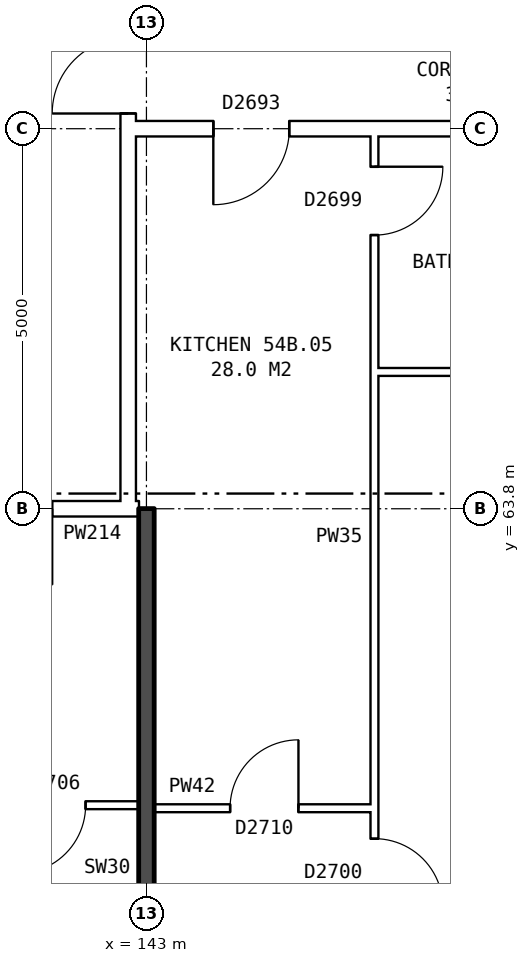
"""IFC4 building model, lengths in metres.
Left out: names, types, materials, properties, quantities, classifications, styles, units other than length and angle.
Written with IfcOpenShell. Run it as: python <this file> out.ifc"""

import sys

from ifc_helpers import new_model, si_unit, direction, frame, frame_2d, origin, place, context, subcontext, project, spatial, rectangle, extrude, element, fill, save


model = new_model("IFC4")
c1 = context("Model", 3, precision=1e-05, world=origin(), true_north=direction((0.0, 1.0)))
c2 = subcontext(c1, "Body", "Model", "MODEL_VIEW")
j1 = project(units=[si_unit("LENGTHUNIT", "METRE"), si_unit("PLANEANGLEUNIT", "RADIAN")], contexts=[c1])
p1 = place(None, origin())
s1 = spatial("IfcSite", under=j1, at=p1, CompositionType="ELEMENT")
p2 = place(p1, origin())
s2 = spatial("IfcBuilding", under=s1, at=p2, CompositionType="ELEMENT")
p3 = place(p2, frame((0.0, 0.0, 191.3)))
s3 = spatial("IfcBuildingStorey", under=s2, at=p3, CompositionType="ELEMENT", Elevation=191.3)
p4 = place(p3, frame((142.76, 63.9, 0.0), z_axis=(0.0, 0.0, 1.0), x_axis=(0.0, 1.0, 0.0)))
e1 = element("IfcWall", 1, at=p4, inside=s3, PredefinedType="PARTITIONING", context=c2, shape_type="SweptSolid", body=[
    extrude(rectangle(XDim=12.2, YDim=0.2, at=frame_2d((6.1, 0.0))), origin(), (0.0, 0.0, 1.0), 2.85),
])
p5 = place(p4, frame((5.1, 0.0, 0.0)))
e2 = element("IfcOpeningElement", 2, at=p5, cuts=e1, PredefinedType="OPENING", context=c2, shape_type="SweptSolid", body=[
    extrude(rectangle(XDim=2.0, YDim=2.1, at=frame_2d((1.0, 1.05))), frame((0.0, 0.11, 0.0), z_axis=(0.0, -1.0, 0.0), x_axis=(1.0, 0.0, 0.0)), (0.0, 0.0, 1.0), 0.22),
])
p6 = place(p3, frame((143.1, 59.86, 0.0), z_axis=(0.0, 0.0, 1.0), x_axis=(1.0, 0.0, 0.0)))
e3 = element("IfcWall", 3, at=p6, inside=s3, PredefinedType="PARTITIONING", context=c2, shape_type="SweptSolid", body=[
    extrude(rectangle(XDim=2.9, YDim=0.1, at=frame_2d((1.45, 0.0))), origin(), (0.0, 0.0, 1.0), 2.85),
])
p7 = place(p6, frame((1.0, 0.0, 0.0)))
e4 = element("IfcOpeningElement", 4, at=p7, cuts=e3, PredefinedType="OPENING", context=c2, shape_type="SweptSolid", body=[
    extrude(rectangle(XDim=0.9, YDim=2.1, at=frame_2d((0.45, 1.05))), frame((0.0, 0.06, 0.0), z_axis=(0.0, -1.0, 0.0), x_axis=(1.0, 0.0, 0.0)), (0.0, 0.0, 1.0), 0.12),
])
p8 = place(p3, frame((137.1, 59.9, 0.0), z_axis=(0.0, 0.0, 1.0), x_axis=(1.0, 0.0, 0.0)))
e5 = element("IfcWall", 5, at=p8, inside=s3, PredefinedType="PARTITIONING", context=c2, shape_type="SweptSolid", body=[
    extrude(rectangle(XDim=5.8, YDim=0.1, at=frame_2d((2.9, 0.0))), origin(), (0.0, 0.0, 1.0), 2.85),
])
p9 = place(p8, frame((1.3, 0.0, 0.0)))
e6 = element("IfcOpeningElement", 6, at=p9, cuts=e5, PredefinedType="OPENING", context=c2, shape_type="SweptSolid", body=[
    extrude(rectangle(XDim=0.9, YDim=2.1, at=frame_2d((0.45, 1.05))), frame((0.0, 0.06, 0.0), z_axis=(0.0, -1.0, 0.0), x_axis=(1.0, 0.0, 0.0)), (0.0, 0.0, 1.0), 0.12),
])
p10 = place(p8, frame((4.2, 0.0, 0.0)))
e7 = element("IfcOpeningElement", 7, at=p10, cuts=e5, PredefinedType="OPENING", context=c2, shape_type="SweptSolid", body=[
    extrude(rectangle(XDim=0.9, YDim=2.1, at=frame_2d((0.45, 1.05))), frame((0.0, 0.06, 0.0), z_axis=(0.0, -1.0, 0.0), x_axis=(1.0, 0.0, 0.0)), (0.0, 0.0, 1.0), 0.12),
])
p11 = place(p3, frame((139.76, 63.8, 0.0), z_axis=(0.0, 0.0, 1.0), x_axis=(1.0, 0.0, 0.0)))
e8 = element("IfcWall", 8, at=p11, inside=s3, PredefinedType="PARTITIONING", context=c2, shape_type="SweptSolid", body=[
    extrude(rectangle(XDim=3.0, YDim=0.2, at=frame_2d((1.5, 0.0))), origin(), (0.0, 0.0, 1.0), 2.85),
])
p12 = place(p11, frame((1.0, 0.0, 0.0)))
e9 = element("IfcOpeningElement", 9, at=p12, cuts=e8, PredefinedType="OPENING", context=c2, shape_type="SweptSolid", body=[
    extrude(rectangle(XDim=1.0, YDim=2.1, at=frame_2d((0.5, 1.05))), frame((0.0, 0.11, 0.0), z_axis=(0.0, -1.0, 0.0), x_axis=(1.0, 0.0, 0.0)), (0.0, 0.0, 1.0), 0.22),
])
p13 = place(p3, frame((142.76, 63.8, 0.0), z_axis=(0.0, 0.0, 1.0), x_axis=(1.0, 0.0, 0.0)))
e10 = element("IfcWall", 10, at=p13, inside=s3, PredefinedType="PARTITIONING", context=c2, shape_type="SweptSolid", body=[
    extrude(rectangle(XDim=0.14, YDim=0.2, at=frame_2d((0.07, 0.0))), origin(), (0.0, 0.0, 1.0), 2.85),
])
p14 = place(p3, frame((146.0, 65.6, 0.0), z_axis=(0.0, 0.0, 1.0), x_axis=(1.0, 0.0, 0.0)))
e11 = element("IfcWall", 11, at=p14, inside=s3, PredefinedType="PARTITIONING", context=c2, shape_type="SweptSolid", body=[
    extrude(rectangle(XDim=2.9, YDim=0.1, at=frame_2d((1.45, 0.0))), origin(), (0.0, 0.0, 1.0), 2.85),
])
p15 = place(p3, frame((142.76, 68.8, 0.0), z_axis=(0.0, 0.0, 1.0), x_axis=(1.0, 0.0, 0.0)))
e12 = element("IfcWall", 12, at=p15, inside=s3, PredefinedType="PARTITIONING", context=c2, shape_type="SweptSolid", body=[
    extrude(rectangle(XDim=14.48, YDim=0.2, at=frame_2d((7.24, 0.0))), origin(), (0.0, 0.0, 1.0), 2.85),
])
p16 = place(p15, frame((1.12, 0.0, 0.0)))
e13 = element("IfcOpeningElement", 13, at=p16, cuts=e12, PredefinedType="OPENING", context=c2, shape_type="SweptSolid", body=[
    extrude(rectangle(XDim=1.0, YDim=2.1, at=frame_2d((0.5, 1.05))), frame((0.0, 0.11, 0.0), z_axis=(0.0, -1.0, 0.0), x_axis=(1.0, 0.0, 0.0)), (0.0, 0.0, 1.0), 0.22),
])
p17 = place(p15, frame((7.24, 0.0, 0.0)))
e14 = element("IfcOpeningElement", 14, at=p17, cuts=e12, PredefinedType="OPENING", context=c2, shape_type="SweptSolid", body=[
    extrude(rectangle(XDim=1.0, YDim=2.1, at=frame_2d((0.5, 1.05))), frame((0.0, 0.11, 0.0), z_axis=(0.0, -1.0, 0.0), x_axis=(1.0, 0.0, 0.0)), (0.0, 0.0, 1.0), 0.22),
])
p18 = place(p3, frame((143.0, 54.36, 0.0), z_axis=(0.0, 0.0, 1.0), x_axis=(0.0, 1.0, 0.0)))
e15 = element("IfcWall", 15, at=p18, inside=s3, PredefinedType="SOLIDWALL", context=c2, shape_type="SweptSolid", body=[
    extrude(rectangle(XDim=9.44, YDim=0.2, at=frame_2d((4.72, 0.0))), origin(), (0.0, 0.0, 1.0), 2.85),
])
p19 = place(p3, frame((146.0, 54.36, 0.0), z_axis=(0.0, 0.0, 1.0), x_axis=(0.0, 1.0, 0.0)))
e16 = element("IfcWall", 16, at=p19, inside=s3, PredefinedType="PARTITIONING", context=c2, shape_type="SweptSolid", body=[
    extrude(rectangle(XDim=14.34, YDim=0.1, at=frame_2d((7.17, 0.0))), origin(), (0.0, 0.0, 1.0), 2.85),
])
p20 = place(p19, frame((4.2, 0.0, 0.0)))
e17 = element("IfcOpeningElement", 17, at=p20, cuts=e16, PredefinedType="OPENING", context=c2, shape_type="SweptSolid", body=[
    extrude(rectangle(XDim=0.9, YDim=2.1, at=frame_2d((0.45, 1.05))), frame((0.0, 0.06, 0.0), z_axis=(0.0, -1.0, 0.0), x_axis=(1.0, 0.0, 0.0)), (0.0, 0.0, 1.0), 0.12),
])
p21 = place(p19, frame((13.04, 0.0, 0.0)))
e18 = element("IfcOpeningElement", 18, at=p21, cuts=e16, PredefinedType="OPENING", context=c2, shape_type="SweptSolid", body=[
    extrude(rectangle(XDim=0.9, YDim=2.1, at=frame_2d((0.45, 1.05))), frame((0.0, 0.06, 0.0), z_axis=(0.0, -1.0, 0.0), x_axis=(1.0, 0.0, 0.0)), (0.0, 0.0, 1.0), 0.12),
])
p22 = place(p5, origin())
e19 = element("IfcDoor", 19, at=p22, inside=s3, OperationType="DOUBLE_DOOR_SINGLE_SWING", PredefinedType="DOOR", context=c2, shape_type="SweptSolid", body=[
    extrude(rectangle(XDim=2.0, YDim=2.1, at=frame_2d((1.0, 1.05))), frame((0.0, 0.025, 0.0), z_axis=(0.0, -1.0, 0.0), x_axis=(1.0, 0.0, 0.0)), (0.0, 0.0, 1.0), 0.05),
])
fill(e2, e19)
p23 = place(p10, frame((0.9, 0.0, 0.0), z_axis=(0.0, 0.0, 1.0), x_axis=(-1.0, 0.0, 0.0)))
e20 = element("IfcDoor", 20, at=p23, inside=s3, OperationType="SINGLE_SWING_RIGHT", PredefinedType="DOOR", context=c2, shape_type="SweptSolid", body=[
    extrude(rectangle(XDim=0.9, YDim=2.1, at=frame_2d((0.45, 1.05))), frame((0.0, 0.025, 0.0), z_axis=(0.0, -1.0, 0.0), x_axis=(1.0, 0.0, 0.0)), (0.0, 0.0, 1.0), 0.05),
])
fill(e7, e20)
p24 = place(p20, frame((0.9, 0.0, 0.0), z_axis=(0.0, 0.0, 1.0), x_axis=(-1.0, 0.0, 0.0)))
e21 = element("IfcDoor", 21, at=p24, inside=s3, OperationType="SINGLE_SWING_RIGHT", PredefinedType="DOOR", context=c2, shape_type="SweptSolid", body=[
    extrude(rectangle(XDim=0.9, YDim=2.1, at=frame_2d((0.45, 1.05))), frame((0.0, 0.025, 0.0), z_axis=(0.0, -1.0, 0.0), x_axis=(1.0, 0.0, 0.0)), (0.0, 0.0, 1.0), 0.05),
])
fill(e17, e21)
p25 = place(p16, frame((1.0, 0.0, 0.0), z_axis=(0.0, 0.0, 1.0), x_axis=(-1.0, 0.0, 0.0)))
e22 = element("IfcDoor", 22, at=p25, inside=s3, OperationType="SINGLE_SWING_RIGHT", PredefinedType="DOOR", context=c2, shape_type="SweptSolid", body=[
    extrude(rectangle(XDim=1.0, YDim=2.1, at=frame_2d((0.5, 1.05))), frame((0.0, 0.025, 0.0), z_axis=(0.0, -1.0, 0.0), x_axis=(1.0, 0.0, 0.0)), (0.0, 0.0, 1.0), 0.05),
])
fill(e13, e22)
p26 = place(p7, origin())
e23 = element("IfcDoor", 23, at=p26, inside=s3, OperationType="SINGLE_SWING_RIGHT", PredefinedType="DOOR", context=c2, shape_type="SweptSolid", body=[
    extrude(rectangle(XDim=0.9, YDim=2.1, at=frame_2d((0.45, 1.05))), frame((0.0, 0.025, 0.0), z_axis=(0.0, -1.0, 0.0), x_axis=(1.0, 0.0, 0.0)), (0.0, 0.0, 1.0), 0.05),
])
fill(e4, e23)
p27 = place(p21, frame((0.9, 0.0, 0.0), z_axis=(0.0, 0.0, 1.0), x_axis=(-1.0, 0.0, 0.0)))
e24 = element("IfcDoor", 24, at=p27, inside=s3, OperationType="SINGLE_SWING_LEFT", PredefinedType="DOOR", context=c2, shape_type="SweptSolid", body=[
    extrude(rectangle(XDim=0.9, YDim=2.1, at=frame_2d((0.45, 1.05))), frame((0.0, 0.025, 0.0), z_axis=(0.0, -1.0, 0.0), x_axis=(1.0, 0.0, 0.0)), (0.0, 0.0, 1.0), 0.05),
])
fill(e18, e24)
save(model, sys.argv[1])
